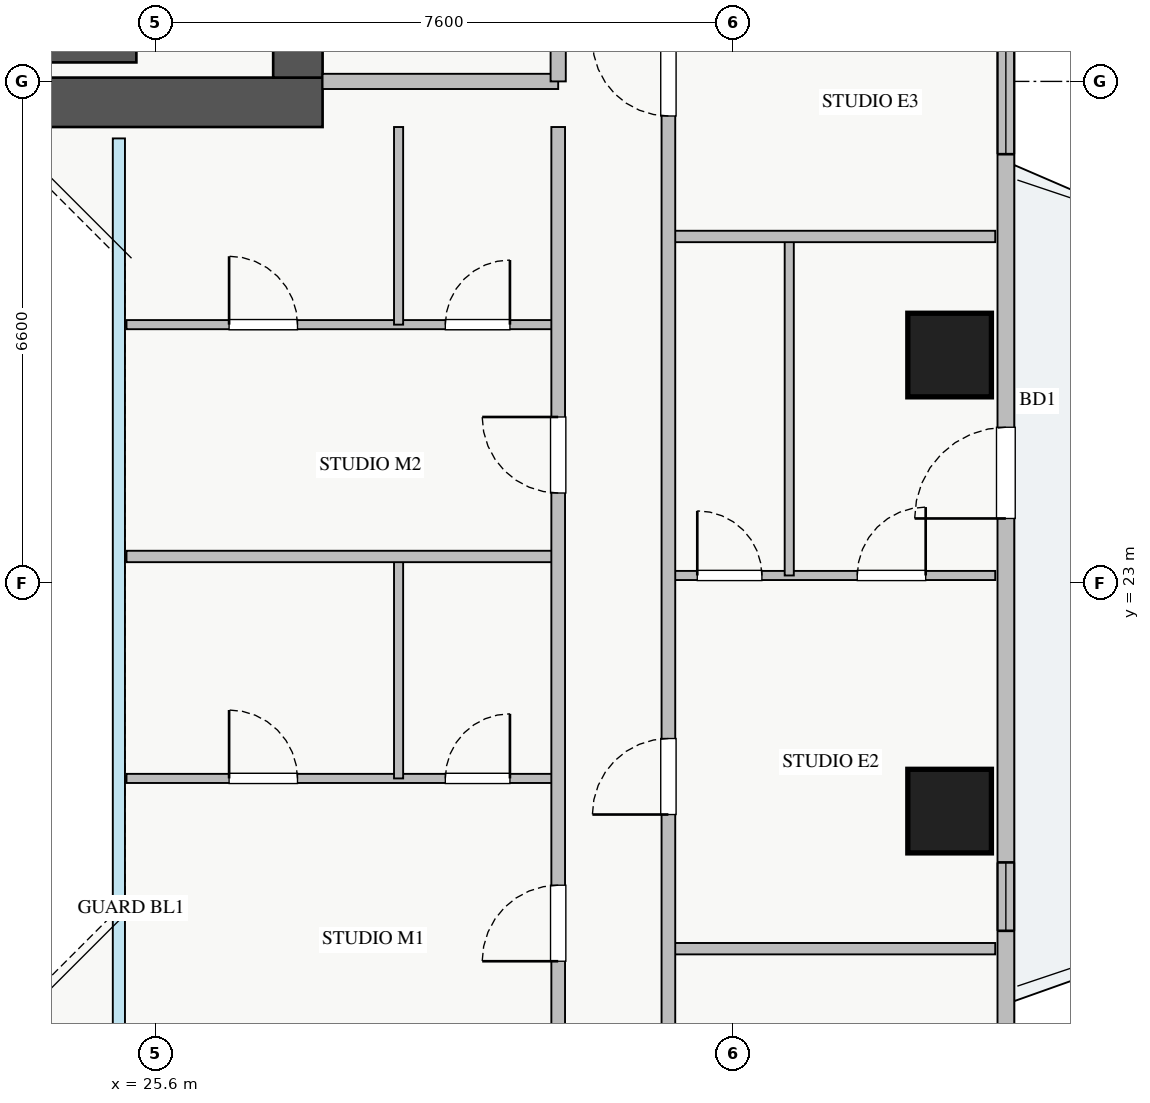
"""IFC4 building model, lengths in metres.
Left out: names, types, materials, properties, quantities, classifications, styles, units other than length and angle.
Written with IfcOpenShell. Run it as: python <this file> out.ifc"""

import sys

from ifc_helpers import new_model, si_unit, direction, frame, frame_2d, origin, origin_2d, place, context, subcontext, project, spatial, rectangle, extrude, source, transform, mapped, element, fill, save


model = new_model("IFC4")
c1 = context("Model", 3, precision=1e-05, world=origin(), true_north=direction((0.0, 1.0)))
c2 = subcontext(c1, "Body", "Model", "MODEL_VIEW")
j1 = project(units=[si_unit("LENGTHUNIT", "METRE"), si_unit("PLANEANGLEUNIT", "RADIAN")], contexts=[c1])
p1 = place(None, origin())
s1 = spatial("IfcSite", under=j1, at=p1, CompositionType="ELEMENT")
p2 = place(p1, origin())
s2 = spatial("IfcBuilding", under=s1, at=p2, CompositionType="ELEMENT")
p3 = place(p2, frame((0.0, 0.0, 126.25)))
s3 = spatial("IfcBuildingStorey", under=s2, at=p3, CompositionType="ELEMENT", Elevation=126.25)
p4 = place(p3, frame((18.2, 29.95, 0.0), z_axis=(0.0, 0.0, 1.0), x_axis=(1.0, 0.0, 0.0)))
e1 = element("IfcWall", 1, at=p4, inside=s3, PredefinedType="SHEAR", context=c2, shape_type="SweptSolid", body=[
    extrude(rectangle(XDim=7.15, YDim=0.2, at=frame_2d((3.575, 0.0))), origin(), (0.0, 0.0, 1.0), 3.25),
])
p5 = place(p3, frame((10.2, 29.325, 0.0), z_axis=(0.0, 0.0, 1.0), x_axis=(1.0, 0.0, 0.0)))
e2 = element("IfcWall", 2, at=p5, inside=s3, PredefinedType="SHEAR", context=c2, shape_type="SweptSolid", body=[
    extrude(rectangle(XDim=17.6, YDim=0.65, at=frame_2d((8.8, 0.0))), origin(), (0.0, 0.0, 1.0), 3.25),
])
p6 = place(p3, frame((27.475, 29.65, 0.0), z_axis=(0.0, 0.0, 1.0), x_axis=(0.0, 1.0, 0.0)))
e3 = element("IfcWall", 3, at=p6, inside=s3, PredefinedType="SHEAR", context=c2, shape_type="SweptSolid", body=[
    extrude(rectangle(XDim=5.9, YDim=0.65, at=frame_2d((2.95, 0.0))), origin(), (0.0, 0.0, 1.0), 3.25),
])
p7 = place(p6, frame((1.1, 0.0, 0.0)))
e4 = element("IfcOpeningElement", 4, at=p7, cuts=e3, PredefinedType="OPENING", context=c2, shape_type="SweptSolid", body=[
    extrude(rectangle(XDim=1.3, YDim=2.05, at=frame_2d((0.65, 1.025))), frame((0.0, 0.335, 0.0), z_axis=(0.0, -1.0, 0.0), x_axis=(1.0, 0.0, 0.0)), (0.0, 0.0, 1.0), 0.67),
])
m1 = source(origin(), c2, "Body", "SweptSolid", [
    extrude(rectangle(XDim=1.1, YDim=1.1, at=origin_2d()), origin(), (0.0, 0.0, 1.0), 3.25),
])
for number, where, z_axis, x_axis in (
    (5, (36.05, 20.0, 0.0), (0.0, 0.0, 1.0), (1.0, 0.0, 0.0)),
    (6, (36.05, 26.0, 0.0), (0.0, 0.0, 1.0), (1.0, 0.0, 0.0)),
):
    element("IfcColumn", number, at=place(p3, frame(where, z_axis=z_axis, x_axis=x_axis)), inside=s3, PredefinedType="COLUMN", context=c2, shape_type="MappedRepresentation", body=[
        mapped(m1, transform((0.0, 0.0, 0.0), x_axis=(1.0, 0.0, 0.0), y_axis=(0.0, 1.0, 0.0), z_axis=(0.0, 0.0, 1.0), scale=1.0)),
    ])
p8 = place(p3, frame((36.79, 10.55, 0.0), z_axis=(0.0, 0.0, 1.0), x_axis=(0.0, 1.0, 0.0)))
e7 = element("IfcWall", 7, at=p8, inside=s3, PredefinedType="STANDARD", context=c2, shape_type="SweptSolid", body=[
    extrude(rectangle(XDim=24.9, YDim=0.22, at=frame_2d((12.45, 0.0))), origin(), (0.0, 0.0, 1.0), 2.61),
])
p9 = place(p8, frame((13.3, 0.0, 0.0)))
e8 = element("IfcOpeningElement", 8, at=p9, cuts=e7, PredefinedType="OPENING", context=c2, shape_type="SweptSolid", body=[
    extrude(rectangle(XDim=1.2, YDim=2.1, at=frame_2d((0.6, 1.05))), frame((0.0, 0.12, 0.0), z_axis=(0.0, -1.0, 0.0), x_axis=(1.0, 0.0, 0.0)), (0.0, 0.0, 1.0), 0.24),
])
p10 = place(p8, frame((1.912, 0.0, 0.9)))
e9 = element("IfcOpeningElement", 9, at=p10, cuts=e7, PredefinedType="OPENING", context=c2, shape_type="SweptSolid", body=[
    extrude(rectangle(XDim=2.4, YDim=1.48, at=frame_2d((1.2, 0.74))), frame((0.0, 0.12, 0.0), z_axis=(0.0, -1.0, 0.0), x_axis=(1.0, 0.0, 0.0)), (0.0, 0.0, 1.0), 0.24),
])
p11 = place(p8, frame((22.165, 0.0, 0.9)))
e10 = element("IfcOpeningElement", 10, at=p11, cuts=e7, PredefinedType="OPENING", context=c2, shape_type="SweptSolid", body=[
    extrude(rectangle(XDim=2.1, YDim=1.5, at=frame_2d((1.05, 0.75))), frame((0.0, 0.12, 0.0), z_axis=(0.0, -1.0, 0.0), x_axis=(1.0, 0.0, 0.0)), (0.0, 0.0, 1.0), 0.24),
])
p12 = place(p8, frame((18.093, 0.0, 0.9)))
e11 = element("IfcOpeningElement", 11, at=p12, cuts=e7, PredefinedType="OPENING", context=c2, shape_type="SweptSolid", body=[
    extrude(rectangle(XDim=2.4, YDim=1.5, at=frame_2d((1.2, 0.75))), frame((0.0, 0.12, 0.0), z_axis=(0.0, -1.0, 0.0), x_axis=(1.0, 0.0, 0.0)), (0.0, 0.0, 1.0), 0.24),
])
p13 = place(p8, frame((7.875, 0.0, 0.9)))
e12 = element("IfcOpeningElement", 12, at=p13, cuts=e7, PredefinedType="OPENING", context=c2, shape_type="SweptSolid", body=[
    extrude(rectangle(XDim=0.9, YDim=1.2, at=frame_2d((0.45, 0.6))), frame((0.0, 0.12, 0.0), z_axis=(0.0, -1.0, 0.0), x_axis=(1.0, 0.0, 0.0)), (0.0, 0.0, 1.0), 0.24),
])
p14 = place(p3, frame((27.8, 29.6, 0.0), z_axis=(0.0, 0.0, 1.0), x_axis=(1.0, 0.0, 0.0)))
e13 = element("IfcWall", 13, at=p14, inside=s3, PredefinedType="PARTITIONING", context=c2, shape_type="SweptSolid", body=[
    extrude(rectangle(XDim=3.1, YDim=0.2, at=frame_2d((1.55, 0.0))), origin(), (0.0, 0.0, 1.0), 3.07),
])
p15 = place(p3, frame((30.9, 29.6, 0.0), z_axis=(0.0, 0.0, 1.0), x_axis=(0.0, 1.0, 0.0)))
e14 = element("IfcWall", 14, at=p15, inside=s3, PredefinedType="PARTITIONING", context=c2, shape_type="SweptSolid", body=[
    extrude(rectangle(XDim=3.9, YDim=0.2, at=frame_2d((1.95, 0.0))), origin(), (0.0, 0.0, 1.0), 3.07),
])
p16 = place(p15, frame((1.4, 0.0, 0.0)))
e15 = element("IfcOpeningElement", 15, at=p16, cuts=e14, PredefinedType="OPENING", context=c2, shape_type="SweptSolid", body=[
    extrude(rectangle(XDim=1.1, YDim=2.05, at=frame_2d((0.55, 1.025))), frame((0.0, 0.11, 0.0), z_axis=(0.0, -1.0, 0.0), x_axis=(1.0, 0.0, 0.0)), (0.0, 0.0, 1.0), 0.22),
])
p17 = place(p3, frame((32.35, 23.1, 0.0), z_axis=(0.0, 0.0, 1.0), x_axis=(1.0, 0.0, 0.0)))
e16 = element("IfcWall", 16, at=p17, inside=s3, PredefinedType="PLUMBINGWALL", context=c2, shape_type="SweptSolid", body=[
    extrude(rectangle(XDim=4.3, YDim=0.12, at=frame_2d((2.15, 0.0))), origin(), (0.0, 0.0, 1.0), 3.07),
])
p18 = place(p17, frame((0.38, 0.0, 0.0)))
e17 = element("IfcOpeningElement", 17, at=p18, cuts=e16, PredefinedType="OPENING", context=c2, shape_type="SweptSolid", body=[
    extrude(rectangle(XDim=0.85, YDim=2.05, at=frame_2d((0.425, 1.025))), frame((0.0, 0.07, 0.0), z_axis=(0.0, -1.0, 0.0), x_axis=(1.0, 0.0, 0.0)), (0.0, 0.0, 1.0), 0.14),
])
p19 = place(p17, frame((2.485, 0.0, 0.0)))
e18 = element("IfcOpeningElement", 18, at=p19, cuts=e16, PredefinedType="OPENING", context=c2, shape_type="SweptSolid", body=[
    extrude(rectangle(XDim=0.9, YDim=2.05, at=frame_2d((0.45, 1.025))), frame((0.0, 0.07, 0.0), z_axis=(0.0, -1.0, 0.0), x_axis=(1.0, 0.0, 0.0)), (0.0, 0.0, 1.0), 0.14),
])
p20 = place(p3, frame((33.94, 23.1, 0.0), z_axis=(0.0, 0.0, 1.0), x_axis=(0.0, 1.0, 0.0)))
e19 = element("IfcWall", 19, at=p20, inside=s3, PredefinedType="PLUMBINGWALL", context=c2, shape_type="SweptSolid", body=[
    extrude(rectangle(XDim=4.46, YDim=0.12, at=frame_2d((2.23, 0.0))), origin(), (0.0, 0.0, 1.0), 3.07),
])
p21 = place(p3, frame((32.35, 18.19, 0.0), z_axis=(0.0, 0.0, 1.0), x_axis=(1.0, 0.0, 0.0)))
e20 = element("IfcWall", 20, at=p21, inside=s3, PredefinedType="PARTITIONING", context=c2, shape_type="SweptSolid", body=[
    extrude(rectangle(XDim=4.3, YDim=0.15, at=frame_2d((2.15, 0.0))), origin(), (0.0, 0.0, 1.0), 2.815),
])
p22 = place(p3, frame((32.35, 27.56, 0.0), z_axis=(0.0, 0.0, 1.0), x_axis=(1.0, 0.0, 0.0)))
e21 = element("IfcWall", 21, at=p22, inside=s3, PredefinedType="PARTITIONING", context=c2, shape_type="SweptSolid", body=[
    extrude(rectangle(XDim=4.3, YDim=0.15, at=frame_2d((2.15, 0.0))), origin(), (0.0, 0.0, 1.0), 3.07),
])
p23 = place(p3, frame((32.35, 8.31, 0.0), z_axis=(0.0, 0.0, 1.0), x_axis=(0.0, 1.0, 0.0)))
e22 = element("IfcWall", 22, at=p23, inside=s3, PredefinedType="PARTITIONING", context=c2, shape_type="SweptSolid", body=[
    extrude(rectangle(XDim=29.37, YDim=0.18, at=frame_2d((14.685, 0.0))), origin(), (0.0, 0.0, 1.0), 3.07),
])
p24 = place(p23, frame((28.06, 0.0, 0.0)))
e23 = element("IfcOpeningElement", 23, at=p24, cuts=e22, PredefinedType="OPENING", context=c2, shape_type="SweptSolid", body=[
    extrude(rectangle(XDim=0.9, YDim=2.05, at=frame_2d((0.45, 1.025))), frame((0.0, 0.1, 0.0), z_axis=(0.0, -1.0, 0.0), x_axis=(1.0, 0.0, 0.0)), (0.0, 0.0, 1.0), 0.2),
])
p25 = place(p23, frame((0.415, 0.0, 0.0)))
e24 = element("IfcOpeningElement", 24, at=p25, cuts=e22, PredefinedType="OPENING", context=c2, shape_type="SweptSolid", body=[
    extrude(rectangle(XDim=0.9, YDim=2.05, at=frame_2d((0.45, 1.025))), frame((0.0, 0.1, 0.0), z_axis=(0.0, -1.0, 0.0), x_axis=(1.0, 0.0, 0.0)), (0.0, 0.0, 1.0), 0.2),
])
p26 = place(p23, frame((5.295, 0.0, 0.0)))
e25 = element("IfcOpeningElement", 25, at=p26, cuts=e22, PredefinedType="OPENING", context=c2, shape_type="SweptSolid", body=[
    extrude(rectangle(XDim=1.0, YDim=2.05, at=frame_2d((0.5, 1.025))), frame((0.0, 0.1, 0.0), z_axis=(0.0, -1.0, 0.0), x_axis=(1.0, 0.0, 0.0)), (0.0, 0.0, 1.0), 0.2),
])
p27 = place(p23, frame((11.645, 0.0, 0.0)))
e26 = element("IfcOpeningElement", 26, at=p27, cuts=e22, PredefinedType="OPENING", context=c2, shape_type="SweptSolid", body=[
    extrude(rectangle(XDim=1.0, YDim=2.05, at=frame_2d((0.5, 1.025))), frame((0.0, 0.1, 0.0), z_axis=(0.0, -1.0, 0.0), x_axis=(1.0, 0.0, 0.0)), (0.0, 0.0, 1.0), 0.2),
])
p28 = place(p23, frame((20.835, 0.0, 0.0)))
e27 = element("IfcOpeningElement", 27, at=p28, cuts=e22, PredefinedType="OPENING", context=c2, shape_type="SweptSolid", body=[
    extrude(rectangle(XDim=1.0, YDim=2.05, at=frame_2d((0.5, 1.025))), frame((0.0, 0.1, 0.0), z_axis=(0.0, -1.0, 0.0), x_axis=(1.0, 0.0, 0.0)), (0.0, 0.0, 1.0), 0.2),
])
p29 = place(p3, frame((25.22, 20.43, 0.0), z_axis=(0.0, 0.0, 1.0), x_axis=(1.0, 0.0, 0.0)))
e28 = element("IfcWall", 28, at=p29, inside=s3, PredefinedType="PLUMBINGWALL", context=c2, shape_type="SweptSolid", body=[
    extrude(rectangle(XDim=5.68, YDim=0.12, at=frame_2d((2.84, 0.0))), origin(), (0.0, 0.0, 1.0), 3.07),
])
p30 = place(p29, frame((1.35, 0.0, 0.0)))
e29 = element("IfcOpeningElement", 29, at=p30, cuts=e28, PredefinedType="OPENING", context=c2, shape_type="SweptSolid", body=[
    extrude(rectangle(XDim=0.9, YDim=2.05, at=frame_2d((0.45, 1.025))), frame((0.0, 0.07, 0.0), z_axis=(0.0, -1.0, 0.0), x_axis=(1.0, 0.0, 0.0)), (0.0, 0.0, 1.0), 0.14),
])
p31 = place(p29, frame((4.195, 0.0, 0.0)))
e30 = element("IfcOpeningElement", 30, at=p31, cuts=e28, PredefinedType="OPENING", context=c2, shape_type="SweptSolid", body=[
    extrude(rectangle(XDim=0.85, YDim=2.05, at=frame_2d((0.425, 1.025))), frame((0.0, 0.07, 0.0), z_axis=(0.0, -1.0, 0.0), x_axis=(1.0, 0.0, 0.0)), (0.0, 0.0, 1.0), 0.14),
])
p32 = place(p3, frame((28.8, 20.43, 0.0), z_axis=(0.0, 0.0, 1.0), x_axis=(0.0, 1.0, 0.0)))
e31 = element("IfcWall", 31, at=p32, inside=s3, PredefinedType="PLUMBINGWALL", context=c2, shape_type="SweptSolid", body=[
    extrude(rectangle(XDim=2.92, YDim=0.12, at=frame_2d((1.46, 0.0))), origin(), (0.0, 0.0, 1.0), 3.07),
])
p33 = place(p3, frame((25.22, 26.4, 0.0), z_axis=(0.0, 0.0, 1.0), x_axis=(1.0, 0.0, 0.0)))
e32 = element("IfcWall", 32, at=p33, inside=s3, PredefinedType="PLUMBINGWALL", context=c2, shape_type="SweptSolid", body=[
    extrude(rectangle(XDim=5.68, YDim=0.12, at=frame_2d((2.84, 0.0))), origin(), (0.0, 0.0, 1.0), 3.07),
])
p34 = place(p33, frame((1.35, 0.0, 0.0)))
e33 = element("IfcOpeningElement", 33, at=p34, cuts=e32, PredefinedType="OPENING", context=c2, shape_type="SweptSolid", body=[
    extrude(rectangle(XDim=0.9, YDim=2.05, at=frame_2d((0.45, 1.025))), frame((0.0, 0.07, 0.0), z_axis=(0.0, -1.0, 0.0), x_axis=(1.0, 0.0, 0.0)), (0.0, 0.0, 1.0), 0.14),
])
p35 = place(p33, frame((4.195, 0.0, 0.0)))
e34 = element("IfcOpeningElement", 34, at=p35, cuts=e32, PredefinedType="OPENING", context=c2, shape_type="SweptSolid", body=[
    extrude(rectangle(XDim=0.85, YDim=2.05, at=frame_2d((0.425, 1.025))), frame((0.0, 0.07, 0.0), z_axis=(0.0, -1.0, 0.0), x_axis=(1.0, 0.0, 0.0)), (0.0, 0.0, 1.0), 0.14),
])
p36 = place(p3, frame((28.8, 26.4, 0.0), z_axis=(0.0, 0.0, 1.0), x_axis=(0.0, 1.0, 0.0)))
e35 = element("IfcWall", 35, at=p36, inside=s3, PredefinedType="PLUMBINGWALL", context=c2, shape_type="SweptSolid", body=[
    extrude(rectangle(XDim=2.6, YDim=0.12, at=frame_2d((1.3, 0.0))), origin(), (0.0, 0.0, 1.0), 3.07),
])
p37 = place(p3, frame((25.22, 23.35, 0.0), z_axis=(0.0, 0.0, 1.0), x_axis=(1.0, 0.0, 0.0)))
e36 = element("IfcWall", 36, at=p37, inside=s3, PredefinedType="PARTITIONING", context=c2, shape_type="SweptSolid", body=[
    extrude(rectangle(XDim=5.68, YDim=0.15, at=frame_2d((2.84, 0.0))), origin(), (0.0, 0.0, 1.0), 3.07),
])
p38 = place(p3, frame((30.9, 17.0, 0.0), z_axis=(0.0, 0.0, 1.0), x_axis=(0.0, 1.0, 0.0)))
e37 = element("IfcWall", 37, at=p38, inside=s3, PredefinedType="PARTITIONING", context=c2, shape_type="SweptSolid", body=[
    extrude(rectangle(XDim=12.0, YDim=0.18, at=frame_2d((6.0, 0.0))), origin(), (0.0, 0.0, 1.0), 3.07),
])
p39 = place(p38, frame((1.025, 0.0, 0.0)))
e38 = element("IfcOpeningElement", 38, at=p39, cuts=e37, PredefinedType="OPENING", context=c2, shape_type="SweptSolid", body=[
    extrude(rectangle(XDim=1.0, YDim=2.05, at=frame_2d((0.5, 1.025))), frame((0.0, 0.1, 0.0), z_axis=(0.0, -1.0, 0.0), x_axis=(1.0, 0.0, 0.0)), (0.0, 0.0, 1.0), 0.2),
])
p40 = place(p38, frame((7.185, 0.0, 0.0)))
e39 = element("IfcOpeningElement", 39, at=p40, cuts=e37, PredefinedType="OPENING", context=c2, shape_type="SweptSolid", body=[
    extrude(rectangle(XDim=1.0, YDim=2.05, at=frame_2d((0.5, 1.025))), frame((0.0, 0.1, 0.0), z_axis=(0.0, -1.0, 0.0), x_axis=(1.0, 0.0, 0.0)), (0.0, 0.0, 1.0), 0.2),
])
m2 = source(origin(), c2, "Body", "SweptSolid", [
    extrude(rectangle(XDim=1.2, YDim=2.1, at=frame_2d((0.6, 1.05))), frame((0.0, 0.025, 0.0), z_axis=(0.0, -1.0, 0.0), x_axis=(1.0, 0.0, 0.0)), (0.0, 0.0, 1.0), 0.05),
])
p41 = place(p9, origin())
e40 = element("IfcDoor", 40, at=p41, inside=s3, OperationType="SINGLE_SWING_LEFT", PredefinedType="DOOR", context=c2, shape_type="MappedRepresentation", body=[
    mapped(m2, transform((0.0, 0.0, 0.0), x_axis=(1.0, 0.0, 0.0), y_axis=(0.0, 1.0, 0.0), z_axis=(0.0, 0.0, 1.0), scale=1.0)),
])
fill(e8, e40)
m3 = source(origin(), c2, "Body", "SweptSolid", [
    extrude(rectangle(XDim=0.85, YDim=2.05, at=frame_2d((0.425, 1.025))), frame((0.0, 0.025, 0.0), z_axis=(0.0, -1.0, 0.0), x_axis=(1.0, 0.0, 0.0)), (0.0, 0.0, 1.0), 0.05),
])
p42 = place(p18, origin())
e41 = element("IfcDoor", 41, at=p42, inside=s3, OperationType="SINGLE_SWING_LEFT", PredefinedType="DOOR", context=c2, shape_type="MappedRepresentation", body=[
    mapped(m3, transform((0.0, 0.0, 0.0), x_axis=(1.0, 0.0, 0.0), y_axis=(0.0, 1.0, 0.0), z_axis=(0.0, 0.0, 1.0), scale=1.0)),
])
fill(e17, e41)
m4 = source(origin(), c2, "Body", "SweptSolid", [
    extrude(rectangle(XDim=0.9, YDim=2.05, at=frame_2d((0.45, 1.025))), frame((0.0, 0.025, 0.0), z_axis=(0.0, -1.0, 0.0), x_axis=(1.0, 0.0, 0.0)), (0.0, 0.0, 1.0), 0.05),
])
p43 = place(p19, origin())
e42 = element("IfcDoor", 42, at=p43, inside=s3, OperationType="SINGLE_SWING_RIGHT", PredefinedType="DOOR", context=c2, shape_type="MappedRepresentation", body=[
    mapped(m4, transform((0.0, 0.0, 0.0), x_axis=(1.0, 0.0, 0.0), y_axis=(0.0, 1.0, 0.0), z_axis=(0.0, 0.0, 1.0), scale=1.0)),
])
fill(e18, e42)
m5 = source(origin(), c2, "Body", "SweptSolid", [
    extrude(rectangle(XDim=1.0, YDim=2.05, at=frame_2d((0.5, 1.025))), frame((0.0, 0.025, 0.0), z_axis=(0.0, -1.0, 0.0), x_axis=(1.0, 0.0, 0.0)), (0.0, 0.0, 1.0), 0.05),
])
p44 = place(p27, origin())
e43 = element("IfcDoor", 43, at=p44, inside=s3, OperationType="SINGLE_SWING_LEFT", PredefinedType="DOOR", context=c2, shape_type="MappedRepresentation", body=[
    mapped(m5, transform((0.0, 0.0, 0.0), x_axis=(1.0, 0.0, 0.0), y_axis=(0.0, 1.0, 0.0), z_axis=(0.0, 0.0, 1.0), scale=1.0)),
])
fill(e26, e43)
p45 = place(p28, origin())
e44 = element("IfcDoor", 44, at=p45, inside=s3, OperationType="SINGLE_SWING_RIGHT", PredefinedType="DOOR", context=c2, shape_type="MappedRepresentation", body=[
    mapped(m5, transform((0.0, 0.0, 0.0), x_axis=(1.0, 0.0, 0.0), y_axis=(0.0, 1.0, 0.0), z_axis=(0.0, 0.0, 1.0), scale=1.0)),
])
fill(e27, e44)
p46 = place(p30, origin())
e45 = element("IfcDoor", 45, at=p46, inside=s3, OperationType="SINGLE_SWING_LEFT", PredefinedType="DOOR", context=c2, shape_type="MappedRepresentation", body=[
    mapped(m4, transform((0.0, 0.0, 0.0), x_axis=(1.0, 0.0, 0.0), y_axis=(0.0, 1.0, 0.0), z_axis=(0.0, 0.0, 1.0), scale=1.0)),
])
fill(e29, e45)
p47 = place(p31, origin())
e46 = element("IfcDoor", 46, at=p47, inside=s3, OperationType="SINGLE_SWING_RIGHT", PredefinedType="DOOR", context=c2, shape_type="MappedRepresentation", body=[
    mapped(m3, transform((0.0, 0.0, 0.0), x_axis=(1.0, 0.0, 0.0), y_axis=(0.0, 1.0, 0.0), z_axis=(0.0, 0.0, 1.0), scale=1.0)),
])
fill(e30, e46)
p48 = place(p34, origin())
e47 = element("IfcDoor", 47, at=p48, inside=s3, OperationType="SINGLE_SWING_LEFT", PredefinedType="DOOR", context=c2, shape_type="MappedRepresentation", body=[
    mapped(m4, transform((0.0, 0.0, 0.0), x_axis=(1.0, 0.0, 0.0), y_axis=(0.0, 1.0, 0.0), z_axis=(0.0, 0.0, 1.0), scale=1.0)),
])
fill(e33, e47)
p49 = place(p35, origin())
e48 = element("IfcDoor", 48, at=p49, inside=s3, OperationType="SINGLE_SWING_RIGHT", PredefinedType="DOOR", context=c2, shape_type="MappedRepresentation", body=[
    mapped(m3, transform((0.0, 0.0, 0.0), x_axis=(1.0, 0.0, 0.0), y_axis=(0.0, 1.0, 0.0), z_axis=(0.0, 0.0, 1.0), scale=1.0)),
])
fill(e34, e48)
p50 = place(p39, origin())
e49 = element("IfcDoor", 49, at=p50, inside=s3, OperationType="SINGLE_SWING_LEFT", PredefinedType="DOOR", context=c2, shape_type="MappedRepresentation", body=[
    mapped(m5, transform((0.0, 0.0, 0.0), x_axis=(1.0, 0.0, 0.0), y_axis=(0.0, 1.0, 0.0), z_axis=(0.0, 0.0, 1.0), scale=1.0)),
])
fill(e38, e49)
p51 = place(p40, origin())
e50 = element("IfcDoor", 50, at=p51, inside=s3, OperationType="SINGLE_SWING_RIGHT", PredefinedType="DOOR", context=c2, shape_type="MappedRepresentation", body=[
    mapped(m5, transform((0.0, 0.0, 0.0), x_axis=(1.0, 0.0, 0.0), y_axis=(0.0, 1.0, 0.0), z_axis=(0.0, 0.0, 1.0), scale=1.0)),
])
fill(e39, e50)
m6 = source(origin(), c2, "Body", "SweptSolid", [
    extrude(rectangle(XDim=2.4, YDim=1.5, at=frame_2d((1.2, 0.75))), frame((0.0, 0.03, 0.0), z_axis=(0.0, -1.0, 0.0), x_axis=(1.0, 0.0, 0.0)), (0.0, 0.0, 1.0), 0.06),
])
p52 = place(p12, origin())
e51 = element("IfcWindow", 51, at=p52, inside=s3, PartitioningType="TRIPLE_PANEL_VERTICAL", PredefinedType="WINDOW", context=c2, shape_type="MappedRepresentation", body=[
    mapped(m6, transform((0.0, 0.0, 0.0), x_axis=(1.0, 0.0, 0.0), y_axis=(0.0, 1.0, 0.0), z_axis=(0.0, 0.0, 1.0), scale=1.0)),
])
fill(e11, e51)
m7 = source(origin(), c2, "Body", "SweptSolid", [
    extrude(rectangle(XDim=0.9, YDim=1.2, at=frame_2d((0.45, 0.6))), frame((0.0, 0.03, 0.0), z_axis=(0.0, -1.0, 0.0), x_axis=(1.0, 0.0, 0.0)), (0.0, 0.0, 1.0), 0.06),
])
p53 = place(p13, origin())
e52 = element("IfcWindow", 52, at=p53, inside=s3, PartitioningType="SINGLE_PANEL", PredefinedType="WINDOW", context=c2, shape_type="MappedRepresentation", body=[
    mapped(m7, transform((0.0, 0.0, 0.0), x_axis=(1.0, 0.0, 0.0), y_axis=(0.0, 1.0, 0.0), z_axis=(0.0, 0.0, 1.0), scale=1.0)),
])
fill(e12, e52)
save(model, sys.argv[1])
